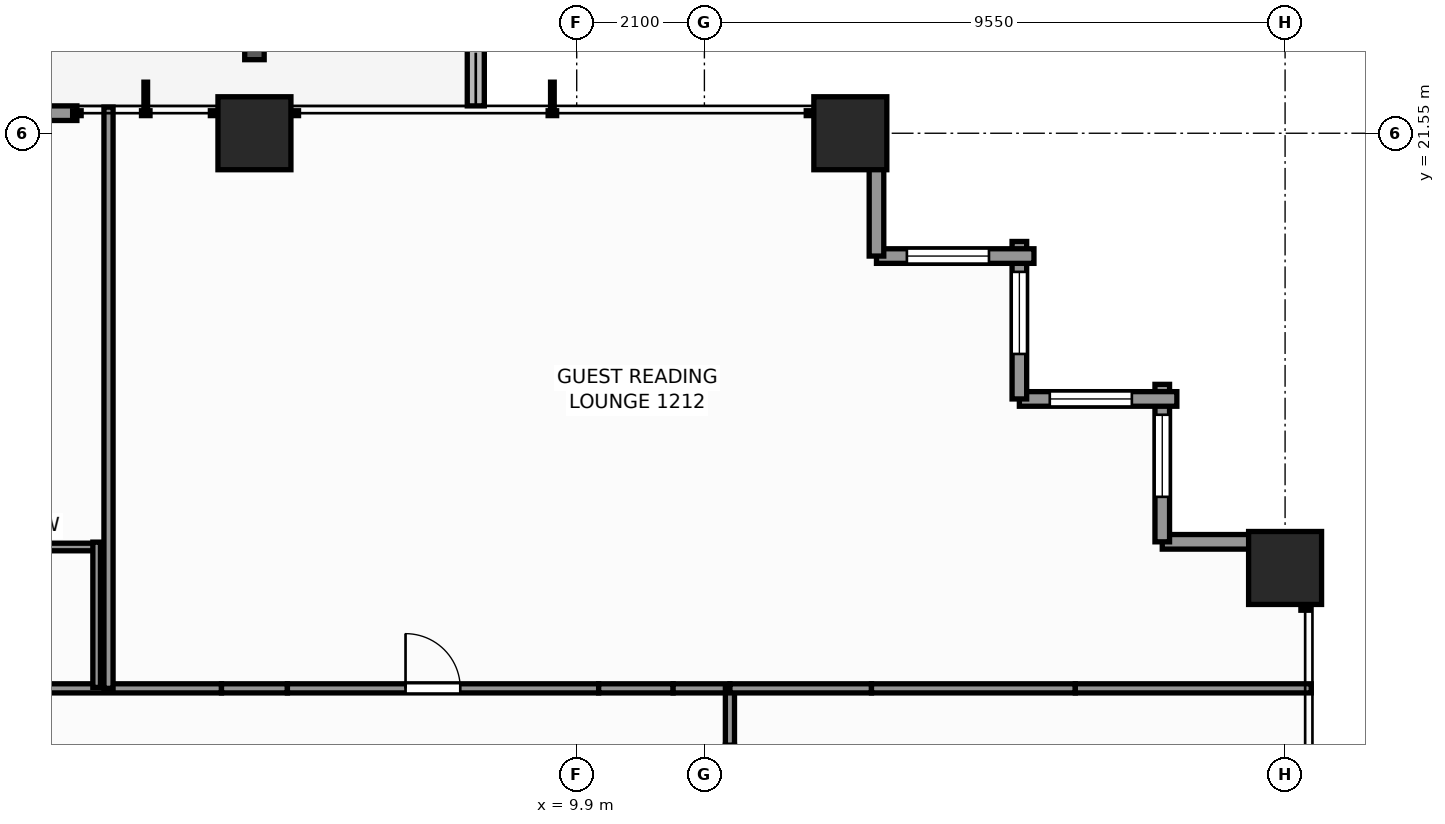
"""IFC4 building model, lengths in metres.
Left out: names, types, materials, properties, quantities, classifications, styles, units other than length and angle.
Written with IfcOpenShell. Run it as: python <this file> out.ifc"""

import sys

from ifc_helpers import new_model, si_unit, direction, frame, frame_2d, origin, origin_2d, place, context, subcontext, project, spatial, rectangle, extrude, element, fill, save


model = new_model("IFC4")
c1 = context("Model", 3, precision=1e-05, world=origin(), true_north=direction((0.0, 1.0)))
c2 = subcontext(c1, "Body", "Model", "MODEL_VIEW")
j1 = project(units=[si_unit("LENGTHUNIT", "METRE"), si_unit("PLANEANGLEUNIT", "RADIAN")], contexts=[c1])
p1 = place(None, origin())
s1 = spatial("IfcSite", under=j1, at=p1, CompositionType="ELEMENT")
p2 = place(p1, origin())
s2 = spatial("IfcBuilding", under=s1, at=p2, CompositionType="ELEMENT")
p3 = place(p2, frame((0.0, 0.0, 43.6)))
s3 = spatial("IfcBuildingStorey", under=s2, at=p3, CompositionType="ELEMENT", Elevation=43.6)
for number, where, z_axis, x_axis in (
    (1, (4.6, 21.55, 0.0), (0.0, 0.0, 1.0), (1.0, 0.0, 0.0)),
    (2, (14.4, 21.55, 0.0), (0.0, 0.0, 1.0), (1.0, 0.0, 0.0)),
    (3, (21.55, 14.4, 0.0), (0.0, 0.0, 1.0), (1.0, 0.0, 0.0)),
):
    element("IfcColumn", number, at=place(p3, frame(where, z_axis=z_axis, x_axis=x_axis)), inside=s3, PredefinedType="COLUMN", context=c2, shape_type="SweptSolid", body=[
        extrude(rectangle(XDim=1.2, YDim=1.2, at=origin_2d()), origin(), (0.0, 0.0, 1.0), 3.3),
    ])
p4 = place(p3, frame((8.24, 22.0, -0.06), z_axis=(0.0, 0.0, 1.0), x_axis=(0.0, 1.0, 0.0)))
e4 = element("IfcWall", 4, at=p4, inside=s3, PredefinedType="PARAPET", context=c2, shape_type="SweptSolid", body=[
    extrude(rectangle(XDim=3.42, YDim=0.28, at=frame_2d((1.71, 0.0))), origin(), (0.0, 0.0, 1.0), 0.42),
])
p5 = place(p3, frame((19.53, 14.83, 0.0), z_axis=(0.0, 0.0, 1.0), x_axis=(1.0, 0.0, 0.0)))
e5 = element("IfcWall", 5, at=p5, inside=s3, PredefinedType="STANDARD", context=c2, shape_type="SweptSolid", body=[
    extrude(rectangle(XDim=2.59, YDim=0.24, at=frame_2d((1.295, 0.0))), origin(), (0.0, 0.0, 1.0), 1.555),
])
p6 = place(p3, frame((19.53, 17.42, 0.0), z_axis=(0.0, 0.0, 1.0), x_axis=(0.0, -1.0, 0.0)))
e6 = element("IfcWall", 6, at=p6, inside=s3, PredefinedType="STANDARD", context=c2, shape_type="SweptSolid", body=[
    extrude(rectangle(XDim=2.59, YDim=0.24, at=frame_2d((1.295, 0.0))), origin(), (0.0, 0.0, 1.0), 2.439),
])
p7 = place(p6, frame((0.5, 0.0, 0.65)))
e7 = element("IfcOpeningElement", 7, at=p7, cuts=e6, PredefinedType="OPENING", context=c2, shape_type="SweptSolid", body=[
    extrude(rectangle(XDim=1.35, YDim=1.55, at=frame_2d((0.675, 0.775))), frame((0.0, 0.13, 0.0), z_axis=(0.0, -1.0, 0.0), x_axis=(1.0, 0.0, 0.0)), (0.0, 0.0, 1.0), 0.26),
])
p8 = place(p3, frame((17.18, 17.18, 0.0), z_axis=(0.0, 0.0, 1.0), x_axis=(1.0, 0.0, 0.0)))
e8 = element("IfcWall", 8, at=p8, inside=s3, PredefinedType="STANDARD", context=c2, shape_type="SweptSolid", body=[
    extrude(rectangle(XDim=2.59, YDim=0.24, at=frame_2d((1.295, 0.0))), origin(), (0.0, 0.0, 1.0), 2.439),
])
p9 = place(p8, frame((0.5, 0.0, 0.65)))
e9 = element("IfcOpeningElement", 9, at=p9, cuts=e8, PredefinedType="OPENING", context=c2, shape_type="SweptSolid", body=[
    extrude(rectangle(XDim=1.35, YDim=1.55, at=frame_2d((0.675, 0.775))), frame((0.0, 0.13, 0.0), z_axis=(0.0, -1.0, 0.0), x_axis=(1.0, 0.0, 0.0)), (0.0, 0.0, 1.0), 0.26),
])
p10 = place(p3, frame((17.18, 19.77, 0.0), z_axis=(0.0, 0.0, 1.0), x_axis=(0.0, -1.0, 0.0)))
e10 = element("IfcWall", 10, at=p10, inside=s3, PredefinedType="STANDARD", context=c2, shape_type="SweptSolid", body=[
    extrude(rectangle(XDim=2.59, YDim=0.24, at=frame_2d((1.295, 0.0))), origin(), (0.0, 0.0, 1.0), 2.439),
])
p11 = place(p10, frame((0.5, 0.0, 0.65)))
e11 = element("IfcOpeningElement", 11, at=p11, cuts=e10, PredefinedType="OPENING", context=c2, shape_type="SweptSolid", body=[
    extrude(rectangle(XDim=1.35, YDim=1.55, at=frame_2d((0.675, 0.775))), frame((0.0, 0.13, 0.0), z_axis=(0.0, -1.0, 0.0), x_axis=(1.0, 0.0, 0.0)), (0.0, 0.0, 1.0), 0.26),
])
p12 = place(p3, frame((14.83, 19.53, 0.0), z_axis=(0.0, 0.0, 1.0), x_axis=(1.0, 0.0, 0.0)))
e12 = element("IfcWall", 12, at=p12, inside=s3, PredefinedType="STANDARD", context=c2, shape_type="SweptSolid", body=[
    extrude(rectangle(XDim=2.59, YDim=0.24, at=frame_2d((1.295, 0.0))), origin(), (0.0, 0.0, 1.0), 2.439),
])
p13 = place(p12, frame((0.5, 0.0, 0.65)))
e13 = element("IfcOpeningElement", 13, at=p13, cuts=e12, PredefinedType="OPENING", context=c2, shape_type="SweptSolid", body=[
    extrude(rectangle(XDim=1.35, YDim=1.55, at=frame_2d((0.675, 0.775))), frame((0.0, 0.13, 0.0), z_axis=(0.0, -1.0, 0.0), x_axis=(1.0, 0.0, 0.0)), (0.0, 0.0, 1.0), 0.26),
])
p14 = place(p3, frame((14.83, 22.12, 0.0), z_axis=(0.0, 0.0, 1.0), x_axis=(0.0, -1.0, 0.0)))
e14 = element("IfcWall", 14, at=p14, inside=s3, PredefinedType="STANDARD", context=c2, shape_type="SweptSolid", body=[
    extrude(rectangle(XDim=2.59, YDim=0.24, at=frame_2d((1.295, 0.0))), origin(), (0.0, 0.0, 1.0), 1.555),
])
p15 = place(p3, frame((-1.68, 21.88, 0.0), z_axis=(0.0, 0.0, 1.0), x_axis=(1.0, 0.0, 0.0)))
e15 = element("IfcWall", 15, at=p15, inside=s3, PredefinedType="STANDARD", context=c2, shape_type="SweptSolid", body=[
    extrude(rectangle(XDim=3.36, YDim=0.24, at=frame_2d((1.68, 0.0))), origin(), (0.0, 0.0, 1.0), 3.06),
])
p16 = place(p15, frame((0.78, 0.0, 0.0)))
e16 = element("IfcOpeningElement", 16, at=p16, cuts=e15, PredefinedType="OPENING", context=c2, shape_type="SweptSolid", body=[
    extrude(rectangle(XDim=1.8, YDim=2.2, at=frame_2d((0.9, 1.1))), frame((0.0, 0.13, 0.0), z_axis=(0.0, -1.0, 0.0), x_axis=(1.0, 0.0, 0.0)), (0.0, 0.0, 1.0), 0.26),
])
p17 = place(p3, frame((-4.058, 12.42, 0.0), z_axis=(0.0, 0.0, 1.0), x_axis=(1.0, 0.0, 0.0)))
e17 = element("IfcWall", 17, at=p17, inside=s3, PredefinedType="PARTITIONING", context=c2, shape_type="SweptSolid", body=[
    extrude(rectangle(XDim=8.116, YDim=0.15, at=frame_2d((4.058, 0.0))), origin(), (0.0, 0.0, 1.0), 2.585),
])
p18 = place(p17, frame((1.186, 0.0, 0.0)))
e18 = element("IfcOpeningElement", 18, at=p18, cuts=e17, PredefinedType="OPENING", context=c2, shape_type="SweptSolid", body=[
    extrude(rectangle(XDim=0.95, YDim=2.06, at=frame_2d((0.475, 1.03))), frame((0.0, 0.085, 0.0), z_axis=(0.0, -1.0, 0.0), x_axis=(1.0, 0.0, 0.0)), (0.0, 0.0, 1.0), 0.17),
])
p19 = place(p3, frame((4.058, 12.42, 0.0), z_axis=(0.0, 0.0, 1.0), x_axis=(1.0, 0.0, 0.0)))
e19 = element("IfcWall", 19, at=p19, inside=s3, PredefinedType="PARTITIONING", context=c2, shape_type="SweptSolid", body=[
    extrude(rectangle(XDim=1.084, YDim=0.15, at=frame_2d((0.542, 0.0))), origin(), (0.0, 0.0, 1.0), 1.545),
])
p20 = place(p3, frame((5.142, 12.42, 0.0), z_axis=(0.0, 0.0, 1.0), x_axis=(1.0, 0.0, 0.0)))
e20 = element("IfcWall", 20, at=p20, inside=s3, PredefinedType="PARTITIONING", context=c2, shape_type="SweptSolid", body=[
    extrude(rectangle(XDim=5.119, YDim=0.15, at=frame_2d((2.56, 0.0))), origin(), (0.0, 0.0, 1.0), 3.06),
])
p21 = place(p20, frame((1.943, 0.0, 0.0)))
e21 = element("IfcOpeningElement", 21, at=p21, cuts=e20, PredefinedType="OPENING", context=c2, shape_type="SweptSolid", body=[
    extrude(rectangle(XDim=0.9, YDim=2.06, at=frame_2d((0.45, 1.03))), frame((0.0, 0.085, 0.0), z_axis=(0.0, -1.0, 0.0), x_axis=(1.0, 0.0, 0.0)), (0.0, 0.0, 1.0), 0.17),
])
p22 = place(p3, frame((10.261, 12.42, 0.0), z_axis=(0.0, 0.0, 1.0), x_axis=(1.0, 0.0, 0.0)))
e22 = element("IfcWall", 22, at=p22, inside=s3, PredefinedType="PARTITIONING", context=c2, shape_type="SweptSolid", body=[
    extrude(rectangle(XDim=1.225, YDim=0.15, at=frame_2d((0.612, 0.0))), origin(), (0.0, 0.0, 1.0), 1.545),
])
for number, where, z_axis, x_axis in (
    (23, (11.486, 12.42, 0.0), (0.0, 0.0, 1.0), (1.0, 0.0, 0.0)),
    (24, (12.42, 11.486, 0.0), (0.0, 0.0, 1.0), (0.0, 1.0, 0.0)),
):
    element("IfcWall", number, at=place(p3, frame(where, z_axis=z_axis, x_axis=x_axis)), inside=s3, PredefinedType="PARTITIONING", context=c2, shape_type="SweptSolid", body=[
        extrude(rectangle(XDim=0.934, YDim=0.15, at=frame_2d((0.467, 0.0))), origin(), (0.0, 0.0, 1.0), 3.06),
    ])
p23 = place(p3, frame((12.42, 12.42, 0.0), z_axis=(0.0, 0.0, 1.0), x_axis=(1.0, 0.0, 0.0)))
e25 = element("IfcWall", 25, at=p23, inside=s3, PredefinedType="PARTITIONING", context=c2, shape_type="SweptSolid", body=[
    extrude(rectangle(XDim=2.328, YDim=0.15, at=frame_2d((1.164, 0.0))), origin(), (0.0, 0.0, 1.0), 3.06),
])
p24 = place(p3, frame((14.748, 12.42, 0.0), z_axis=(0.0, 0.0, 1.0), x_axis=(1.0, 0.0, 0.0)))
e26 = element("IfcWall", 26, at=p24, inside=s3, PredefinedType="PARTITIONING", context=c2, shape_type="SweptSolid", body=[
    extrude(rectangle(XDim=3.352, YDim=0.15, at=frame_2d((1.676, 0.0))), origin(), (0.0, 0.0, 1.0), 1.545),
])
p25 = place(p3, frame((18.1, 12.42, 0.0), z_axis=(0.0, 0.0, 1.0), x_axis=(1.0, 0.0, 0.0)))
e27 = element("IfcWall", 27, at=p25, inside=s3, PredefinedType="PARTITIONING", context=c2, shape_type="SweptSolid", body=[
    extrude(rectangle(XDim=3.88, YDim=0.15, at=frame_2d((1.94, 0.0))), origin(), (0.0, 0.0, 1.0), 2.429),
])
p26 = place(p3, frame((2.2, 12.42, 0.0), z_axis=(0.0, 0.0, 1.0), x_axis=(0.0, 1.0, 0.0)))
e28 = element("IfcWall", 28, at=p26, inside=s3, PredefinedType="PARTITIONING", context=c2, shape_type="SweptSolid", body=[
    extrude(rectangle(XDim=9.56, YDim=0.15, at=frame_2d((4.78, 0.0))), origin(), (0.0, 0.0, 1.0), 2.429),
])
p27 = place(p3, frame((-0.705, 14.745, 0.0), z_axis=(0.0, 0.0, 1.0), x_axis=(1.0, 0.0, 0.0)))
e29 = element("IfcWall", 29, at=p27, inside=s3, PredefinedType="PARTITIONING", context=c2, shape_type="SweptSolid", body=[
    extrude(rectangle(XDim=2.77, YDim=0.125, at=frame_2d((1.385, 0.0))), origin(), (0.0, 0.0, 1.0), 2.585),
])
p28 = place(p3, frame((2.005, 12.435, 0.0), z_axis=(0.0, 0.0, 1.0), x_axis=(0.0, 1.0, 0.0)))
e30 = element("IfcWall", 30, at=p28, inside=s3, PredefinedType="PARTITIONING", context=c2, shape_type="SweptSolid", body=[
    extrude(rectangle(XDim=2.39, YDim=0.125, at=frame_2d((1.195, 0.0))), origin(), (0.0, 0.0, 1.0), 3.06),
])
p29 = place(p7, origin())
e31 = element("IfcWindow", 31, at=p29, inside=s3, PartitioningType="SINGLE_PANEL", PredefinedType="WINDOW", context=c2, shape_type="SweptSolid", body=[
    extrude(rectangle(XDim=1.35, YDim=1.55, at=frame_2d((0.675, 0.775))), frame((0.0, 0.03, 0.0), z_axis=(0.0, -1.0, 0.0), x_axis=(1.0, 0.0, 0.0)), (0.0, 0.0, 1.0), 0.06),
])
fill(e7, e31)
p30 = place(p9, origin())
e32 = element("IfcWindow", 32, at=p30, inside=s3, PartitioningType="SINGLE_PANEL", PredefinedType="WINDOW", context=c2, shape_type="SweptSolid", body=[
    extrude(rectangle(XDim=1.35, YDim=1.55, at=frame_2d((0.675, 0.775))), frame((0.0, 0.03, 0.0), z_axis=(0.0, -1.0, 0.0), x_axis=(1.0, 0.0, 0.0)), (0.0, 0.0, 1.0), 0.06),
])
fill(e9, e32)
p31 = place(p11, origin())
e33 = element("IfcWindow", 33, at=p31, inside=s3, PartitioningType="SINGLE_PANEL", PredefinedType="WINDOW", context=c2, shape_type="SweptSolid", body=[
    extrude(rectangle(XDim=1.35, YDim=1.55, at=frame_2d((0.675, 0.775))), frame((0.0, 0.03, 0.0), z_axis=(0.0, -1.0, 0.0), x_axis=(1.0, 0.0, 0.0)), (0.0, 0.0, 1.0), 0.06),
])
fill(e11, e33)
p32 = place(p13, origin())
e34 = element("IfcWindow", 34, at=p32, inside=s3, PartitioningType="SINGLE_PANEL", PredefinedType="WINDOW", context=c2, shape_type="SweptSolid", body=[
    extrude(rectangle(XDim=1.35, YDim=1.55, at=frame_2d((0.675, 0.775))), frame((0.0, 0.03, 0.0), z_axis=(0.0, -1.0, 0.0), x_axis=(1.0, 0.0, 0.0)), (0.0, 0.0, 1.0), 0.06),
])
fill(e13, e34)
p33 = place(p21, origin())
e35 = element("IfcDoor", 35, at=p33, inside=s3, OperationType="SINGLE_SWING_LEFT", PredefinedType="DOOR", context=c2, shape_type="SweptSolid", body=[
    extrude(rectangle(XDim=0.9, YDim=2.06, at=frame_2d((0.45, 1.03))), frame((0.0, 0.025, 0.0), z_axis=(0.0, -1.0, 0.0), x_axis=(1.0, 0.0, 0.0)), (0.0, 0.0, 1.0), 0.05),
])
fill(e21, e35)
save(model, sys.argv[1])
